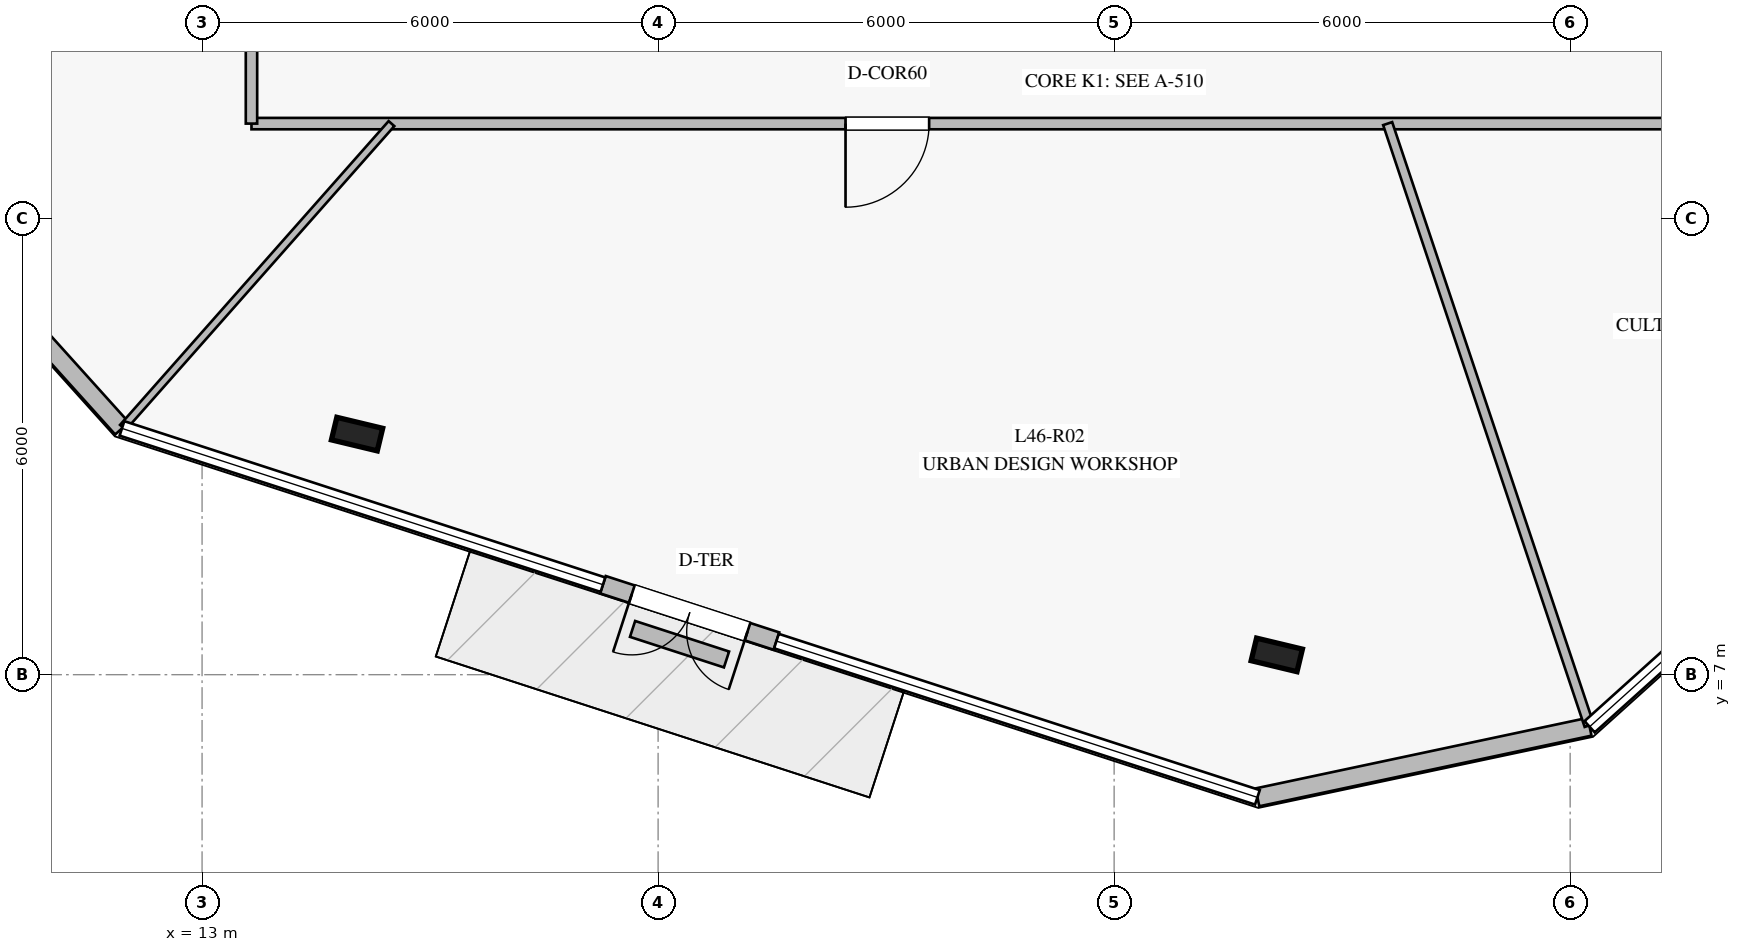
"""IFC4 building model, lengths in metres.
Left out: names, types, materials, properties, quantities, classifications, styles, units other than length and angle.
Written with IfcOpenShell. Run it as: python <this file> out.ifc"""

import sys

from ifc_helpers import new_model, si_unit, direction, frame, frame_2d, origin, origin_2d, place, context, subcontext, project, spatial, rectangle, i_section, extrude, element, fill, save


model = new_model("IFC4")
c1 = context("Model", 3, precision=1e-05, world=origin(), true_north=direction((0.0, 1.0)))
c2 = subcontext(c1, "Body", "Model", "MODEL_VIEW")
j1 = project(units=[si_unit("LENGTHUNIT", "METRE"), si_unit("PLANEANGLEUNIT", "RADIAN")], contexts=[c1])
p1 = place(None, origin())
s1 = spatial("IfcSite", under=j1, at=p1, CompositionType="ELEMENT")
p2 = place(p1, origin())
s2 = spatial("IfcBuilding", under=s1, at=p2, CompositionType="ELEMENT")
p3 = place(p2, frame((0.0, 0.0, 192.8)))
s3 = spatial("IfcBuildingStorey", under=s2, at=p3, CompositionType="ELEMENT", Elevation=192.8)
for number, where, z_axis, x_axis in (
    (1, (10.707, 14.276, 0.0), (0.0, 0.0, 1.0), (-0.284, 0.959, 0.0)),
    (2, (15.039, 10.165, 0.0), (0.0, 0.0, 1.0), (-0.972, 0.233, 0.0)),
    (3, (27.14, 7.26, 0.0), (0.0, 0.0, 1.0), (-0.972, 0.233, 0.0)),
):
    element("IfcColumn", number, at=place(p3, frame(where, z_axis=z_axis, x_axis=x_axis)), inside=s3, PredefinedType="COLUMN", context=c2, shape_type="SweptSolid", body=[
        extrude(i_section(OverallWidth=0.305, OverallDepth=0.62, WebThickness=0.021, FlangeThickness=0.04, at=origin_2d()), origin(), (0.0, 0.0, 1.0), 4.0),
    ])
p4 = place(p3, frame((8.956, 13.56, 0.0), z_axis=(0.0, 0.0, 1.0), x_axis=(0.669203190827, -0.74307946371, 0.0)))
e4 = element("IfcWall", 4, at=p4, inside=s3, PredefinedType="STANDARD", context=c2, shape_type="SweptSolid", body=[
    extrude(rectangle(XDim=4.468, YDim=0.24, at=frame_2d((2.234, 0.0))), origin(), (0.0, 0.0, 1.0), 3.78),
])
p5 = place(p3, frame((18.274, 8.184, 0.0), z_axis=(0.0, 0.0, 1.0), x_axis=(0.951006411901, -0.309171157328, 0.0)))
e5 = element("IfcWall", 5, at=p5, inside=s3, PredefinedType="STANDARD", context=c2, shape_type="SweptSolid", body=[
    extrude(rectangle(XDim=2.401, YDim=0.24, at=frame_2d((1.2, 0.0))), origin(), (0.0, 0.0, 1.0), 3.78),
])
p6 = place(p5, frame((0.4, 0.0, 0.0)))
e6 = element("IfcOpeningElement", 6, at=p6, cuts=e5, PredefinedType="OPENING", context=c2, shape_type="SweptSolid", body=[
    extrude(rectangle(XDim=1.6, YDim=2.25, at=frame_2d((0.8, 1.125))), frame((0.0, 0.13, 0.0), z_axis=(0.0, -1.0, 0.0), x_axis=(1.0, 0.0, 0.0)), (0.0, 0.0, 1.0), 0.26),
])
p7 = place(p3, frame((26.885, 5.386, 0.0), z_axis=(0.0, 0.0, 1.0), x_axis=(0.978154407503, 0.20787966491, 0.0)))
e7 = element("IfcWall", 7, at=p7, inside=s3, PredefinedType="STANDARD", context=c2, shape_type="SweptSolid", body=[
    extrude(rectangle(XDim=4.469, YDim=0.24, at=frame_2d((2.234, 0.0))), origin(), (0.0, 0.0, 1.0), 3.78),
])
p8 = place(p3, frame((18.664, 7.602, 0.0), z_axis=(0.0, 0.0, 1.0), x_axis=(0.950931858287, -0.309400389293, 0.0)))
e8 = element("IfcWall", 8, at=p8, inside=s3, PredefinedType="USERDEFINED", context=c2, shape_type="SweptSolid", body=[
    extrude(rectangle(XDim=1.3, YDim=0.22, at=frame_2d((0.65, 0.0))), origin(), (0.0, 0.0, 1.0), 0.4),
])
p9 = place(p3, frame((36.35, 14.25, 0.0), z_axis=(0.0, 0.0, 1.0), x_axis=(-1.0, 0.0, 0.0)))
e9 = element("IfcWall", 9, at=p9, inside=s3, PredefinedType="PARTITIONING", context=c2, shape_type="SweptSolid", body=[
    extrude(rectangle(XDim=22.7, YDim=0.15, at=frame_2d((11.35, 0.0))), origin(), (0.0, 0.0, 1.0), 3.05),
])
p10 = place(p9, frame((13.784, 0.0, 0.0)))
e10 = element("IfcOpeningElement", 10, at=p10, cuts=e9, PredefinedType="OPENING", context=c2, shape_type="SweptSolid", body=[
    extrude(rectangle(XDim=1.1, YDim=2.2, at=frame_2d((0.55, 1.1))), frame((0.0, 0.085, 0.0), z_axis=(0.0, -1.0, 0.0), x_axis=(1.0, 0.0, 0.0)), (0.0, 0.0, 1.0), 0.17),
])
p11 = place(p3, frame((13.65, 14.25, 0.0), z_axis=(0.0, 0.0, 1.0), x_axis=(0.0, 1.0, 0.0)))
e11 = element("IfcWall", 11, at=p11, inside=s3, PredefinedType="PARTITIONING", context=c2, shape_type="SweptSolid", body=[
    extrude(rectangle(XDim=21.5, YDim=0.15, at=frame_2d((10.75, 0.0))), origin(), (0.0, 0.0, 1.0), 3.05),
])
p12 = place(p11, frame((4.946, 0.0, 0.0)))
e12 = element("IfcOpeningElement", 12, at=p12, cuts=e11, PredefinedType="OPENING", context=c2, shape_type="SweptSolid", body=[
    extrude(rectangle(XDim=1.1, YDim=2.2, at=frame_2d((0.55, 1.1))), frame((0.0, 0.085, 0.0), z_axis=(0.0, -1.0, 0.0), x_axis=(1.0, 0.0, 0.0)), (0.0, 0.0, 1.0), 0.17),
])
p13 = place(p3, frame((15.492, 14.25, 0.0), z_axis=(0.0, 0.0, 1.0), x_axis=(-0.662370464817, -0.749176459412, 0.0)))
e13 = element("IfcWall", 13, at=p13, inside=s3, PredefinedType="MOVABLE", context=c2, shape_type="SweptSolid", body=[
    extrude(rectangle(XDim=5.335, YDim=0.1, at=frame_2d((2.667, 0.0))), origin(), (0.0, 0.0, 1.0), 3.18),
])
p14 = place(p3, frame((28.599, 14.25, 0.0), z_axis=(0.0, 0.0, 1.0), x_axis=(0.317473059153, -0.948267291808, 0.0)))
e14 = element("IfcWall", 14, at=p14, inside=s3, PredefinedType="PARTITIONING", context=c2, shape_type="SweptSolid", body=[
    extrude(rectangle(XDim=8.35, YDim=0.125, at=frame_2d((4.175, 0.0))), origin(), (0.0, 0.0, 1.0), 3.18),
])
p15 = place(p6, frame((1.6, 0.0, 0.0), z_axis=(0.0, 0.0, 1.0), x_axis=(-1.0, 0.0, 0.0)))
e15 = element("IfcDoor", 15, at=p15, inside=s3, OperationType="DOUBLE_DOOR_SINGLE_SWING", PredefinedType="DOOR", context=c2, shape_type="SweptSolid", body=[
    extrude(rectangle(XDim=1.6, YDim=2.25, at=frame_2d((0.8, 1.125))), frame((0.0, 0.025, 0.0), z_axis=(0.0, -1.0, 0.0), x_axis=(1.0, 0.0, 0.0)), (0.0, 0.0, 1.0), 0.05),
])
fill(e6, e15)
p16 = place(p10, origin())
e16 = element("IfcDoor", 16, at=p16, inside=s3, OperationType="SINGLE_SWING_RIGHT", PredefinedType="DOOR", context=c2, shape_type="SweptSolid", body=[
    extrude(rectangle(XDim=1.1, YDim=2.2, at=frame_2d((0.55, 1.1))), frame((0.0, 0.025, 0.0), z_axis=(0.0, -1.0, 0.0), x_axis=(1.0, 0.0, 0.0)), (0.0, 0.0, 1.0), 0.05),
])
fill(e10, e16)
save(model, sys.argv[1])
